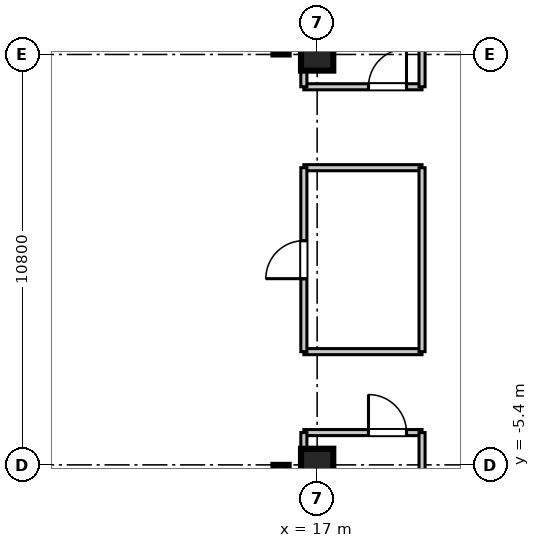
"""IFC4 building model, lengths in metres.
Left out: names, types, materials, properties, quantities, classifications, styles, units other than length and angle.
Written with IfcOpenShell. Run it as: python <this file> out.ifc"""

import sys

from ifc_helpers import new_model, si_unit, direction, frame, frame_2d, origin, origin_2d, place, context, subcontext, project, spatial, rectangle, extrude, source, transform, mapped, element, fill, save


model = new_model("IFC4")
c1 = context("Model", 3, precision=1e-05, world=origin(), true_north=direction((0.0, 1.0)))
c2 = subcontext(c1, "Body", "Model", "MODEL_VIEW")
j1 = project(units=[si_unit("LENGTHUNIT", "METRE"), si_unit("PLANEANGLEUNIT", "RADIAN")], contexts=[c1])
p1 = place(None, origin())
s1 = spatial("IfcSite", under=j1, at=p1, CompositionType="ELEMENT")
p2 = place(p1, origin())
s2 = spatial("IfcBuilding", under=s1, at=p2, CompositionType="ELEMENT")
p3 = place(p2, frame((0.0, 0.0, 327.15)))
s3 = spatial("IfcBuildingStorey", under=s2, at=p3, CompositionType="ELEMENT", Elevation=327.15)
m1 = source(origin(), c2, "Body", "SweptSolid", [
    extrude(rectangle(XDim=0.85, YDim=0.85, at=origin_2d()), origin(), (0.0, 0.0, 1.0), 3.755),
])
for number, where, z_axis, x_axis in (
    (1, (17.0, -5.4, 0.0), (0.0, 0.0, 1.0), (1.0, 0.0, 0.0)),
    (2, (17.0, 5.4, 0.0), (0.0, 0.0, 1.0), (1.0, 0.0, 0.0)),
):
    element("IfcColumn", number, at=place(p3, frame(where, z_axis=z_axis, x_axis=x_axis)), inside=s3, PredefinedType="PILASTER", context=c2, shape_type="MappedRepresentation", body=[
        mapped(m1, transform((0.0, 0.0, 0.0), scale=1.0)),
    ])
m2 = source(origin(), c2, "Body", "SweptSolid", [
    extrude(rectangle(XDim=11.6, YDim=0.4, at=frame_2d((5.8, 0.0))), origin(), (0.0, 0.0, 1.0), 3.5),
])
for number, where, z_axis, x_axis in (
    (3, (16.05, 5.4, 0.0), (0.0, 0.0, 1.0), (0.0, 1.0, 0.0)),
    (4, (16.05, -17.0, 0.0), (0.0, 0.0, 1.0), (0.0, 1.0, 0.0)),
):
    element("IfcWall", number, at=place(p3, frame(where, z_axis=z_axis, x_axis=x_axis)), inside=s3, PredefinedType="SHEAR", context=c2, shape_type="MappedRepresentation", body=[
        mapped(m2, transform((0.0, 0.0, 0.0), scale=1.0)),
    ])
m3 = source(origin(), c2, "Body", "SweptSolid", [
    extrude(rectangle(XDim=3.11, YDim=0.16, at=frame_2d((1.555, 0.0))), origin(), (0.0, 0.0, 1.0), 2.84),
])
p4 = place(p3, frame((16.65, 4.55, 0.0), z_axis=(0.0, 0.0, 1.0), x_axis=(1.0, 0.0, 0.0)))
e5 = element("IfcWall", 5, at=p4, inside=s3, PredefinedType="PARTITIONING", context=c2, shape_type="MappedRepresentation", body=[
    mapped(m3, transform((0.0, 0.0, 0.0), scale=1.0)),
])
p5 = place(p4, frame((1.701, 0.0, 0.0)))
e6 = element("IfcOpeningElement", 6, at=p5, cuts=e5, PredefinedType="OPENING", context=c2, shape_type="SweptSolid", body=[
    extrude(rectangle(XDim=1.0, YDim=2.1, at=frame_2d((0.5, 1.05))), frame((0.0, 0.09, 0.0), z_axis=(0.0, -1.0, 0.0), x_axis=(1.0, 0.0, 0.0)), (0.0, 0.0, 1.0), 0.18),
])
m4 = source(origin(), c2, "Body", "SweptSolid", [
    extrude(rectangle(XDim=17.95, YDim=0.16, at=frame_2d((8.975, 0.0))), origin(), (0.0, 0.0, 1.0), 2.84),
])
p6 = place(p3, frame((16.65, 4.55, 0.0), z_axis=(0.0, 0.0, 1.0), x_axis=(0.0, 1.0, 0.0)))
e7 = element("IfcWall", 7, at=p6, inside=s3, PredefinedType="PARTITIONING", context=c2, shape_type="MappedRepresentation", body=[
    mapped(m4, transform((0.0, 0.0, 0.0), scale=1.0)),
])
m5 = source(origin(), c2, "Body", "SweptSolid", [
    extrude(rectangle(XDim=16.53, YDim=0.16, at=frame_2d((8.265, 0.0))), origin(), (0.0, 0.0, 1.0), 2.84),
])
p7 = place(p3, frame((19.76, 4.55, 0.0), z_axis=(0.0, 0.0, 1.0), x_axis=(0.0, 1.0, 0.0)))
e8 = element("IfcWall", 8, at=p7, inside=s3, PredefinedType="PARTITIONING", context=c2, shape_type="MappedRepresentation", body=[
    mapped(m5, transform((0.0, 0.0, 0.0), scale=1.0)),
])
p8 = place(p3, frame((16.65, -4.55, 0.0), z_axis=(0.0, 0.0, 1.0), x_axis=(1.0, 0.0, 0.0)))
e9 = element("IfcWall", 9, at=p8, inside=s3, PredefinedType="PARTITIONING", context=c2, shape_type="MappedRepresentation", body=[
    mapped(m3, transform((0.0, 0.0, 0.0), scale=1.0)),
])
p9 = place(p8, frame((1.701, 0.0, 0.0)))
e10 = element("IfcOpeningElement", 10, at=p9, cuts=e9, PredefinedType="OPENING", context=c2, shape_type="SweptSolid", body=[
    extrude(rectangle(XDim=1.0, YDim=2.1, at=frame_2d((0.5, 1.05))), frame((0.0, 0.09, 0.0), z_axis=(0.0, -1.0, 0.0), x_axis=(1.0, 0.0, 0.0)), (0.0, 0.0, 1.0), 0.18),
])
p10 = place(p3, frame((16.65, -22.5, 0.0), z_axis=(0.0, 0.0, 1.0), x_axis=(0.0, 1.0, 0.0)))
e11 = element("IfcWall", 11, at=p10, inside=s3, PredefinedType="PARTITIONING", context=c2, shape_type="MappedRepresentation", body=[
    mapped(m4, transform((0.0, 0.0, 0.0), scale=1.0)),
])
p11 = place(p3, frame((19.76, -21.08, 0.0), z_axis=(0.0, 0.0, 1.0), x_axis=(0.0, 1.0, 0.0)))
e12 = element("IfcWall", 12, at=p11, inside=s3, PredefinedType="PARTITIONING", context=c2, shape_type="MappedRepresentation", body=[
    mapped(m5, transform((0.0, 0.0, 0.0), scale=1.0)),
])
for number, where, z_axis, x_axis in (
    (13, (16.65, -2.42, 0.0), (0.0, 0.0, 1.0), (1.0, 0.0, 0.0)),
    (14, (16.65, 2.42, 0.0), (0.0, 0.0, 1.0), (1.0, 0.0, 0.0)),
):
    element("IfcWall", number, at=place(p3, frame(where, z_axis=z_axis, x_axis=x_axis)), inside=s3, PredefinedType="PARTITIONING", context=c2, shape_type="MappedRepresentation", body=[
        mapped(m3, transform((0.0, 0.0, 0.0), scale=1.0)),
    ])
m6 = source(origin(), c2, "Body", "SweptSolid", [
    extrude(rectangle(XDim=4.84, YDim=0.16, at=frame_2d((2.42, 0.0))), origin(), (0.0, 0.0, 1.0), 2.84),
])
p12 = place(p3, frame((16.65, -2.42, 0.0), z_axis=(0.0, 0.0, 1.0), x_axis=(0.0, 1.0, 0.0)))
e15 = element("IfcWall", 15, at=p12, inside=s3, PredefinedType="PARTITIONING", context=c2, shape_type="MappedRepresentation", body=[
    mapped(m6, transform((0.0, 0.0, 0.0), scale=1.0)),
])
p13 = place(p12, frame((1.92, 0.0, 0.0)))
e16 = element("IfcOpeningElement", 16, at=p13, cuts=e15, PredefinedType="OPENING", context=c2, shape_type="SweptSolid", body=[
    extrude(rectangle(XDim=1.0, YDim=2.1, at=frame_2d((0.5, 1.05))), frame((0.0, 0.09, 0.0), z_axis=(0.0, -1.0, 0.0), x_axis=(1.0, 0.0, 0.0)), (0.0, 0.0, 1.0), 0.18),
])
p14 = place(p3, frame((19.76, -2.42, 0.0), z_axis=(0.0, 0.0, 1.0), x_axis=(0.0, 1.0, 0.0)))
e17 = element("IfcWall", 17, at=p14, inside=s3, PredefinedType="PARTITIONING", context=c2, shape_type="MappedRepresentation", body=[
    mapped(m6, transform((0.0, 0.0, 0.0), scale=1.0)),
])
m7 = source(origin(), c2, "Body", "SweptSolid", [
    extrude(rectangle(XDim=1.0, YDim=2.1, at=frame_2d((0.5, 1.05))), frame((0.0, 0.025, 0.0), z_axis=(0.0, -1.0, 0.0), x_axis=(1.0, 0.0, 0.0)), (0.0, 0.0, 1.0), 0.05),
])
p15 = place(p5, origin())
e18 = element("IfcDoor", 18, at=p15, inside=s3, OperationType="SINGLE_SWING_RIGHT", PredefinedType="DOOR", context=c2, shape_type="MappedRepresentation", body=[
    mapped(m7, transform((0.0, 0.0, 0.0), scale=1.0)),
])
fill(e6, e18)
p16 = place(p9, frame((1.0, 0.0, 0.0), z_axis=(0.0, 0.0, 1.0), x_axis=(-1.0, 0.0, 0.0)))
e19 = element("IfcDoor", 19, at=p16, inside=s3, OperationType="SINGLE_SWING_LEFT", PredefinedType="DOOR", context=c2, shape_type="MappedRepresentation", body=[
    mapped(m7, transform((0.0, 0.0, 0.0), scale=1.0)),
])
fill(e10, e19)
p17 = place(p13, frame((1.0, 0.0, 0.0), z_axis=(0.0, 0.0, 1.0), x_axis=(-1.0, 0.0, 0.0)))
e20 = element("IfcDoor", 20, at=p17, inside=s3, OperationType="SINGLE_SWING_LEFT", PredefinedType="DOOR", context=c2, shape_type="MappedRepresentation", body=[
    mapped(m7, transform((0.0, 0.0, 0.0), scale=1.0)),
])
fill(e16, e20)
save(model, sys.argv[1])
